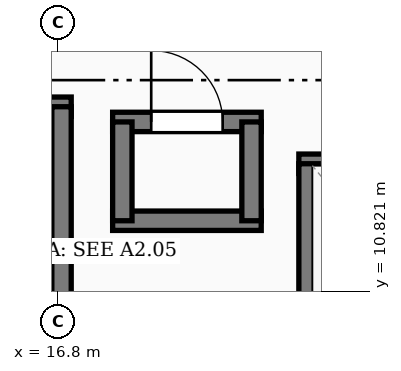
"""IFC4 building model, lengths in metres.
Left out: names, types, materials, properties, quantities, classifications, styles, units other than length and angle.
Written with IfcOpenShell. Run it as: python <this file> out.ifc"""

import sys

from ifc_helpers import new_model, si_unit, direction, frame, frame_2d, origin, place, context, subcontext, project, spatial, rectangle, extrude, element, fill, save


model = new_model("IFC4")
c1 = context("Model", 3, precision=1e-05, world=origin(), true_north=direction((0.0, 1.0)))
c2 = subcontext(c1, "Body", "Model", "MODEL_VIEW")
j1 = project(units=[si_unit("LENGTHUNIT", "METRE"), si_unit("PLANEANGLEUNIT", "RADIAN")], contexts=[c1])
p1 = place(None, origin())
s1 = spatial("IfcSite", under=j1, at=p1, CompositionType="ELEMENT")
p2 = place(p1, origin())
s2 = spatial("IfcBuilding", under=s1, at=p2, CompositionType="ELEMENT")
p3 = place(p2, frame((0.0, 0.0, -7.56)))
s3 = spatial("IfcBuildingStorey", under=s2, at=p3, CompositionType="ELEMENT", Elevation=-7.56)
p4 = place(p3, frame((8.752, 13.25, -0.5), z_axis=(0.0, 0.0, 1.0), x_axis=(1.0, 0.0, 0.0)))
e1 = element("IfcWall", 1, at=p4, inside=s3, PredefinedType="SOLIDWALL", context=c2, shape_type="SweptSolid", body=[
    extrude(rectangle(XDim=8.225, YDim=0.255, at=frame_2d((4.113, 0.0))), origin(), (0.0, 0.0, 1.0), 3.46),
])
p5 = place(p4, frame((0.35, 0.0, 0.5)))
e2 = element("IfcOpeningElement", 2, at=p5, cuts=e1, PredefinedType="OPENING", context=c2, shape_type="SweptSolid", body=[
    extrude(rectangle(XDim=1.25, YDim=2.2, at=frame_2d((0.625, 1.1))), frame((0.0, 0.137, 0.0), z_axis=(0.0, -1.0, 0.0), x_axis=(1.0, 0.0, 0.0)), (0.0, 0.0, 1.0), 0.275),
])
p6 = place(p3, frame((16.85, 9.38, -0.5), z_axis=(0.0, 0.0, 1.0), x_axis=(0.0, 1.0, 0.0)))
e3 = element("IfcWall", 3, at=p6, inside=s3, PredefinedType="SOLIDWALL", context=c2, shape_type="SweptSolid", body=[
    extrude(rectangle(XDim=3.87, YDim=0.255, at=frame_2d((1.935, 0.0))), origin(), (0.0, 0.0, 1.0), 3.46),
])
p7 = place(p3, frame((19.972, 12.5, -0.5), z_axis=(0.0, 0.0, 1.0), x_axis=(1.0, 0.0, 0.0)))
e4 = element("IfcWall", 4, at=p7, inside=s3, PredefinedType="SOLIDWALL", context=c2, shape_type="SweptSolid", body=[
    extrude(rectangle(XDim=2.455, YDim=0.255, at=frame_2d((1.228, 0.0))), origin(), (0.0, 0.0, 1.0), 3.46),
])
p8 = place(p7, frame((0.677, 0.0, 0.5)))
e5 = element("IfcOpeningElement", 5, at=p8, cuts=e4, PredefinedType="OPENING", context=c2, shape_type="SweptSolid", body=[
    extrude(rectangle(XDim=1.1, YDim=2.15, at=frame_2d((0.55, 1.075))), frame((0.0, 0.137, 0.0), z_axis=(0.0, -1.0, 0.0), x_axis=(1.0, 0.0, 0.0)), (0.0, 0.0, 1.0), 0.275),
])
p9 = place(p3, frame((20.1, 9.9, -0.5), z_axis=(0.0, 0.0, 1.0), x_axis=(0.0, 1.0, 0.0)))
e6 = element("IfcWall", 6, at=p9, inside=s3, PredefinedType="SOLIDWALL", context=c2, shape_type="SweptSolid", body=[
    extrude(rectangle(XDim=2.6, YDim=0.255, at=frame_2d((1.3, 0.0))), origin(), (0.0, 0.0, 1.0), 3.46),
])
p10 = place(p3, frame((17.522, 11.75, -0.5), z_axis=(0.0, 0.0, 1.0), x_axis=(1.0, 0.0, 0.0)))
e7 = element("IfcWall", 7, at=p10, inside=s3, PredefinedType="SOLIDWALL", context=c2, shape_type="SweptSolid", body=[
    extrude(rectangle(XDim=1.955, YDim=0.255, at=frame_2d((0.978, 0.0))), origin(), (0.0, 0.0, 1.0), 3.46),
])
p11 = place(p3, frame((17.522, 13.05, -0.5), z_axis=(0.0, 0.0, 1.0), x_axis=(1.0, 0.0, 0.0)))
e8 = element("IfcWall", 8, at=p11, inside=s3, PredefinedType="SOLIDWALL", context=c2, shape_type="SweptSolid", body=[
    extrude(rectangle(XDim=1.955, YDim=0.255, at=frame_2d((0.978, 0.0))), origin(), (0.0, 0.0, 1.0), 3.46),
])
p12 = place(p11, frame((0.508, 0.0, 0.5)))
e9 = element("IfcOpeningElement", 9, at=p12, cuts=e8, PredefinedType="OPENING", context=c2, shape_type="SweptSolid", body=[
    extrude(rectangle(XDim=0.94, YDim=2.1, at=frame_2d((0.47, 1.05))), frame((0.0, 0.137, 0.0), z_axis=(0.0, -1.0, 0.0), x_axis=(1.0, 0.0, 0.0)), (0.0, 0.0, 1.0), 0.275),
])
for number, where, z_axis, x_axis in (
    (10, (17.65, 11.75, -0.5), (0.0, 0.0, 1.0), (0.0, 1.0, 0.0)),
    (11, (19.35, 11.75, -0.5), (0.0, 0.0, 1.0), (0.0, 1.0, 0.0)),
):
    element("IfcWall", number, at=place(p3, frame(where, z_axis=z_axis, x_axis=x_axis)), inside=s3, PredefinedType="SOLIDWALL", context=c2, shape_type="SweptSolid", body=[
        extrude(rectangle(XDim=1.3, YDim=0.255, at=frame_2d((0.65, 0.0))), origin(), (0.0, 0.0, 1.0), 3.46),
    ])
p13 = place(p12, origin())
e12 = element("IfcDoor", 12, at=p13, inside=s3, OperationType="SINGLE_SWING_LEFT", PredefinedType="DOOR", context=c2, shape_type="SweptSolid", body=[
    extrude(rectangle(XDim=0.94, YDim=2.1, at=frame_2d((0.47, 1.05))), frame((0.0, 0.025, 0.0), z_axis=(0.0, -1.0, 0.0), x_axis=(1.0, 0.0, 0.0)), (0.0, 0.0, 1.0), 0.05),
])
fill(e9, e12)
save(model, sys.argv[1])
